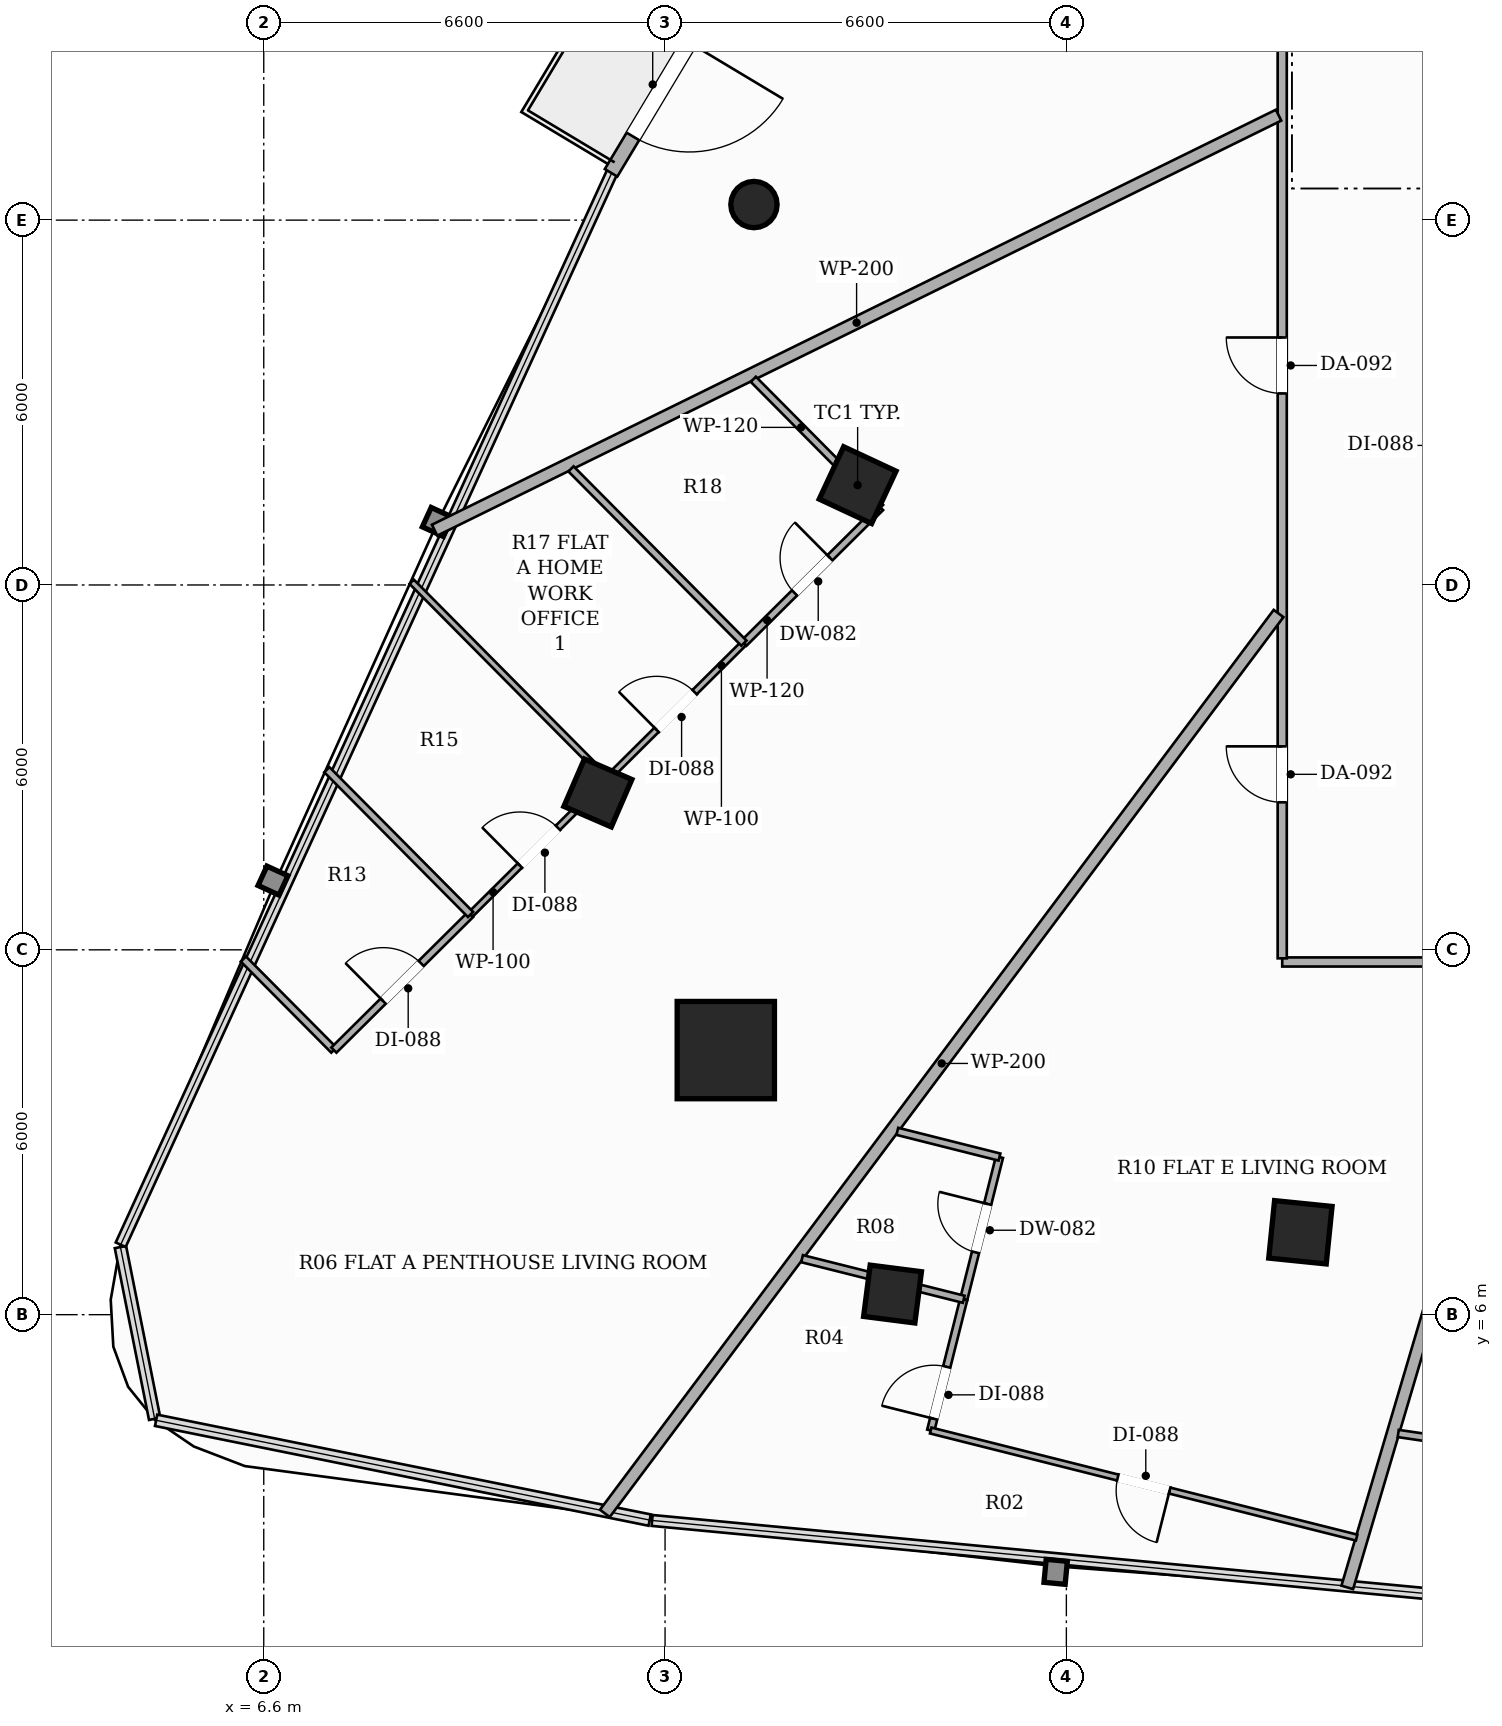
"""IFC4 building model, lengths in metres.
Left out: names, types, materials, properties, quantities, classifications, styles, units other than length and angle.
Written with IfcOpenShell. Run it as: python <this file> out.ifc"""

import sys

from ifc_helpers import new_model, si_unit, direction, frame, frame_2d, origin, origin_2d, place, context, subcontext, project, spatial, rectangle, hollow_rectangle, hollow_circle, extrude, element, fill, save


model = new_model("IFC4")
c1 = context("Model", 3, precision=1e-05, world=origin(), true_north=direction((0.0, 1.0)))
c2 = subcontext(c1, "Body", "Model", "MODEL_VIEW")
j1 = project(units=[si_unit("LENGTHUNIT", "METRE"), si_unit("PLANEANGLEUNIT", "RADIAN")], contexts=[c1])
p1 = place(None, origin())
s1 = spatial("IfcSite", under=j1, at=p1, CompositionType="ELEMENT")
p2 = place(p1, origin())
s2 = spatial("IfcBuilding", under=s1, at=p2, CompositionType="ELEMENT")
p3 = place(p2, frame((0.0, 0.0, 36.8)))
s3 = spatial("IfcBuildingStorey", under=s2, at=p3, CompositionType="ELEMENT", Elevation=36.8)
p4 = place(p3, frame((14.199, 10.351, 0.0), z_axis=(0.0, 0.0, 1.0), x_axis=(1.0, 0.0, 0.0)))
e1 = element("IfcColumn", 1, at=p4, inside=s3, PredefinedType="COLUMN", context=c2, shape_type="SweptSolid", body=[
    extrude(hollow_rectangle(XDim=1.6, YDim=1.6, WallThickness=0.05, at=origin_2d()), origin(), (0.0, 0.0, 1.0), 3.3),
])
for number, where, z_axis, x_axis in (
    (2, (16.367, 19.642, 0.0), (0.0, 0.0, 1.0), (0.423, 0.906, 0.0)),
    (3, (23.649, 7.355, 0.0), (0.0, 0.0, 1.0), (-0.995, 0.101, 0.0)),
):
    element("IfcColumn", number, at=place(p3, frame(where, z_axis=z_axis, x_axis=x_axis)), inside=s3, PredefinedType="COLUMN", context=c2, shape_type="SweptSolid", body=[
        extrude(hollow_rectangle(XDim=0.95, YDim=0.95, WallThickness=0.032, at=origin_2d()), origin(), (0.0, 0.0, 1.0), 3.3),
    ])
for number, where, z_axis, x_axis in (
    (4, (12.095, 14.58, 0.0), (0.0, 0.0, 1.0), (0.397, 0.918, 0.0)),
    (5, (16.941, 6.339, 0.0), (0.0, 0.0, 1.0), (-0.992, 0.127, 0.0)),
):
    element("IfcColumn", number, at=place(p3, frame(where, z_axis=z_axis, x_axis=x_axis)), inside=s3, PredefinedType="COLUMN", context=c2, shape_type="SweptSolid", body=[
        extrude(hollow_rectangle(XDim=0.85, YDim=0.85, WallThickness=0.028, at=origin_2d()), origin(), (0.0, 0.0, 1.0), 3.3),
    ])
p5 = place(p3, frame((14.662, 24.256, 0.0), z_axis=(0.0, 0.0, 1.0), x_axis=(1.0, 0.0, 0.0)))
e6 = element("IfcColumn", 6, at=p5, inside=s3, PredefinedType="COLUMN", context=c2, shape_type="SweptSolid", body=[
    extrude(hollow_circle(Radius=0.381, WallThickness=0.022, at=origin_2d()), origin(), (0.0, 0.0, 1.0), 3.3),
])
p6 = place(p3, frame((19.059, 36.028, 0.0), z_axis=(0.0, 0.0, 1.0), x_axis=(-0.514331531946, -0.857591438417, 0.0)))
e7 = element("IfcWall", 7, at=p6, inside=s3, PredefinedType="SOLIDWALL", context=c2, shape_type="SweptSolid", body=[
    extrude(rectangle(XDim=13.118, YDim=0.24, at=frame_2d((6.559, 0.0))), origin(), (0.0, 0.0, 1.0), 2.624),
])
p7 = place(p6, frame((10.62, 0.0, 0.0)))
e8 = element("IfcOpeningElement", 8, at=p7, cuts=e7, PredefinedType="OPENING", context=c2, shape_type="SweptSolid", body=[
    extrude(rectangle(XDim=1.8, YDim=2.2, at=frame_2d((0.9, 1.1))), frame((0.0, 0.13, 0.0), z_axis=(0.0, -1.0, 0.0), x_axis=(1.0, 0.0, 0.0)), (0.0, 0.0, 1.0), 0.26),
])
p8 = place(p3, frame((42.59, 11.8, 0.0), z_axis=(0.0, 0.0, 1.0), x_axis=(-1.0, 0.0, 0.0)))
e9 = element("IfcWall", 9, at=p8, inside=s3, PredefinedType="PARTITIONING", context=c2, shape_type="SweptSolid", body=[
    extrude(rectangle(XDim=19.24, YDim=0.15, at=frame_2d((9.62, 0.0))), origin(), (0.0, 0.0, 1.0), 2.669),
])
p9 = place(p8, frame((10.462, 0.0, 0.0)))
e10 = element("IfcOpeningElement", 10, at=p9, cuts=e9, PredefinedType="OPENING", context=c2, shape_type="SweptSolid", body=[
    extrude(rectangle(XDim=0.92, YDim=2.15, at=frame_2d((0.46, 1.075))), frame((0.0, 0.085, 0.0), z_axis=(0.0, -1.0, 0.0), x_axis=(1.0, 0.0, 0.0)), (0.0, 0.0, 1.0), 0.17),
])
p10 = place(p3, frame((23.35, 11.86, 0.0), z_axis=(0.0, 0.0, 1.0), x_axis=(0.0, 1.0, 0.0)))
e11 = element("IfcWall", 11, at=p10, inside=s3, PredefinedType="PARTITIONING", context=c2, shape_type="SweptSolid", body=[
    extrude(rectangle(XDim=25.04, YDim=0.15, at=frame_2d((12.52, 0.0))), origin(), (0.0, 0.0, 1.0), 2.413),
])
p11 = place(p10, frame((9.29, 0.0, 0.0)))
e12 = element("IfcOpeningElement", 12, at=p11, cuts=e11, PredefinedType="OPENING", context=c2, shape_type="SweptSolid", body=[
    extrude(rectangle(XDim=0.92, YDim=2.15, at=frame_2d((0.46, 1.075))), frame((0.0, 0.085, 0.0), z_axis=(0.0, -1.0, 0.0), x_axis=(1.0, 0.0, 0.0)), (0.0, 0.0, 1.0), 0.17),
])
p12 = place(p10, frame((18.865, 0.0, 0.0)))
e13 = element("IfcOpeningElement", 13, at=p12, cuts=e11, PredefinedType="OPENING", context=c2, shape_type="SweptSolid", body=[
    extrude(rectangle(XDim=0.88, YDim=2.1, at=frame_2d((0.44, 1.05))), frame((0.0, 0.085, 0.0), z_axis=(0.0, -1.0, 0.0), x_axis=(1.0, 0.0, 0.0)), (0.0, 0.0, 1.0), 0.17),
])
p13 = place(p10, frame((2.566, 0.0, 0.0)))
e14 = element("IfcOpeningElement", 14, at=p13, cuts=e11, PredefinedType="OPENING", context=c2, shape_type="SweptSolid", body=[
    extrude(rectangle(XDim=0.92, YDim=2.15, at=frame_2d((0.46, 1.075))), frame((0.0, 0.085, 0.0), z_axis=(0.0, -1.0, 0.0), x_axis=(1.0, 0.0, 0.0)), (0.0, 0.0, 1.0), 0.17),
])
p14 = place(p3, frame((9.41, 18.901, 0.0), z_axis=(0.0, 0.0, 1.0), x_axis=(0.89737804177, 0.44126256373, 0.0)))
e15 = element("IfcWall", 15, at=p14, inside=s3, PredefinedType="PARTITIONING", context=c2, shape_type="SweptSolid", body=[
    extrude(rectangle(XDim=15.468, YDim=0.2, at=frame_2d((7.734, 0.0))), origin(), (0.0, 0.0, 1.0), 2.413),
])
p15 = place(p3, frame((23.29, 17.531, 0.0), z_axis=(0.0, 0.0, 1.0), x_axis=(-0.599334217596, -0.800498904196, 0.0)))
e16 = element("IfcWall", 16, at=p15, inside=s3, PredefinedType="PARTITIONING", context=c2, shape_type="SweptSolid", body=[
    extrude(rectangle(XDim=18.487, YDim=0.2, at=frame_2d((9.244, 0.0))), origin(), (0.0, 0.0, 1.0), 2.413),
])
p16 = place(p3, frame((27.447, 11.74, 0.0), z_axis=(0.0, 0.0, 1.0), x_axis=(-0.283867721737, -0.958863450422, 0.0)))
e17 = element("IfcWall", 17, at=p16, inside=s3, PredefinedType="PARTITIONING", context=c2, shape_type="SweptSolid", body=[
    extrude(rectangle(XDim=10.664, YDim=0.2, at=frame_2d((5.332, 0.0))), origin(), (0.0, 0.0, 1.0), 2.413),
])
p17 = place(p3, frame((14.497, 17.043, 0.0), z_axis=(0.0, 0.0, 1.0), x_axis=(0.709608291954, 0.704596389425, 0.0)))
e18 = element("IfcWall", 18, at=p17, inside=s3, PredefinedType="PARTITIONING", context=c2, shape_type="SweptSolid", body=[
    extrude(rectangle(XDim=3.166, YDim=0.12, at=frame_2d((1.583, 0.0))), origin(), (0.0, 0.0, 1.0), 2.413),
])
p18 = place(p17, frame((1.173, 0.0, 0.0)))
e19 = element("IfcOpeningElement", 19, at=p18, cuts=e18, PredefinedType="OPENING", context=c2, shape_type="SweptSolid", body=[
    extrude(rectangle(XDim=0.82, YDim=2.1, at=frame_2d((0.41, 1.05))), frame((0.0, 0.07, 0.0), z_axis=(0.0, -1.0, 0.0), x_axis=(1.0, 0.0, 0.0)), (0.0, 0.0, 1.0), 0.14),
])
p19 = place(p3, frame((16.744, 19.274, 0.0), z_axis=(0.0, 0.0, 1.0), x_axis=(-0.704390177625, 0.709812987811, 0.0)))
e20 = element("IfcWall", 20, at=p19, inside=s3, PredefinedType="PARTITIONING", context=c2, shape_type="SweptSolid", body=[
    extrude(rectangle(XDim=2.971, YDim=0.12, at=frame_2d((1.486, 0.0))), origin(), (0.0, 0.0, 1.0), 2.413),
])
p20 = place(p3, frame((6.265, 11.849, 0.0), z_axis=(0.0, 0.0, 1.0), x_axis=(0.7047325022, -0.709473114602, 0.0)))
e21 = element("IfcWall", 21, at=p20, inside=s3, PredefinedType="PARTITIONING", context=c2, shape_type="SweptSolid", body=[
    extrude(rectangle(XDim=2.112, YDim=0.12, at=frame_2d((1.056, 0.0))), origin(), (0.0, 0.0, 1.0), 2.619),
])
p21 = place(p3, frame((7.753, 10.351, 0.0), z_axis=(0.0, 0.0, 1.0), x_axis=(0.709953794815, 0.704248258236, 0.0)))
e22 = element("IfcWall", 22, at=p21, inside=s3, PredefinedType="PARTITIONING", context=c2, shape_type="SweptSolid", body=[
    extrude(rectangle(XDim=3.167, YDim=0.12, at=frame_2d((1.583, 0.0))), origin(), (0.0, 0.0, 1.0), 2.619),
])
p22 = place(p21, frame((1.143, 0.0, 0.0)))
e23 = element("IfcOpeningElement", 23, at=p22, cuts=e22, PredefinedType="OPENING", context=c2, shape_type="SweptSolid", body=[
    extrude(rectangle(XDim=0.88, YDim=2.1, at=frame_2d((0.44, 1.05))), frame((0.0, 0.07, 0.0), z_axis=(0.0, -1.0, 0.0), x_axis=(1.0, 0.0, 0.0)), (0.0, 0.0, 1.0), 0.14),
])
p23 = place(p3, frame((10.001, 12.581, 0.0), z_axis=(0.0, 0.0, 1.0), x_axis=(0.70979961262, 0.70440365553, 0.0)))
e24 = element("IfcWall", 24, at=p23, inside=s3, PredefinedType="PARTITIONING", context=c2, shape_type="SweptSolid", body=[
    extrude(rectangle(XDim=3.167, YDim=0.1, at=frame_2d((1.583, 0.0))), origin(), (0.0, 0.0, 1.0), 2.413),
])
p24 = place(p23, frame((1.144, 0.0, 0.0)))
e25 = element("IfcOpeningElement", 25, at=p24, cuts=e24, PredefinedType="OPENING", context=c2, shape_type="SweptSolid", body=[
    extrude(rectangle(XDim=0.88, YDim=2.1, at=frame_2d((0.44, 1.05))), frame((0.0, 0.06, 0.0), z_axis=(0.0, -1.0, 0.0), x_axis=(1.0, 0.0, 0.0)), (0.0, 0.0, 1.0), 0.12),
])
p25 = place(p3, frame((12.249, 14.812, 0.0), z_axis=(0.0, 0.0, 1.0), x_axis=(0.70979961262, 0.70440365553, 0.0)))
e26 = element("IfcWall", 26, at=p25, inside=s3, PredefinedType="PARTITIONING", context=c2, shape_type="SweptSolid", body=[
    extrude(rectangle(XDim=3.167, YDim=0.1, at=frame_2d((1.583, 0.0))), origin(), (0.0, 0.0, 1.0), 2.413),
])
p26 = place(p25, frame((1.144, 0.0, 0.0)))
e27 = element("IfcOpeningElement", 27, at=p26, cuts=e26, PredefinedType="OPENING", context=c2, shape_type="SweptSolid", body=[
    extrude(rectangle(XDim=0.88, YDim=2.1, at=frame_2d((0.44, 1.05))), frame((0.0, 0.06, 0.0), z_axis=(0.0, -1.0, 0.0), x_axis=(1.0, 0.0, 0.0)), (0.0, 0.0, 1.0), 0.12),
])
p27 = place(p3, frame((14.497, 17.043, 0.0), z_axis=(0.0, 0.0, 1.0), x_axis=(-0.704380529073, 0.70982256252, 0.0)))
e28 = element("IfcWall", 28, at=p27, inside=s3, PredefinedType="PARTITIONING", context=c2, shape_type="SweptSolid", body=[
    extrude(rectangle(XDim=4.038, YDim=0.12, at=frame_2d((2.019, 0.0))), origin(), (0.0, 0.0, 1.0), 2.413),
])
p28 = place(p3, frame((7.638, 14.962, 0.0), z_axis=(0.0, 0.0, 1.0), x_axis=(0.704445292194, -0.709758290058, 0.0)))
e29 = element("IfcWall", 29, at=p28, inside=s3, PredefinedType="PARTITIONING", context=c2, shape_type="SweptSolid", body=[
    extrude(rectangle(XDim=3.354, YDim=0.12, at=frame_2d((1.677, 0.0))), origin(), (0.0, 0.0, 1.0), 3.06),
])
p29 = place(p3, frame((9.033, 18.053, 0.0), z_axis=(0.0, 0.0, 1.0), x_axis=(0.704374497722, -0.709828547579, 0.0)))
e30 = element("IfcWall", 30, at=p29, inside=s3, PredefinedType="PARTITIONING", context=c2, shape_type="SweptSolid", body=[
    extrude(rectangle(XDim=4.566, YDim=0.1, at=frame_2d((2.283, 0.0))), origin(), (0.0, 0.0, 1.0), 2.413),
])
p30 = place(p3, frame((18.112, 6.253, 0.0), z_axis=(0.0, 0.0, 1.0), x_axis=(0.2437501366, 0.96983806427, 0.0)))
e31 = element("IfcWall", 31, at=p30, inside=s3, PredefinedType="PARTITIONING", context=c2, shape_type="SweptSolid", body=[
    extrude(rectangle(XDim=2.412, YDim=0.12, at=frame_2d((1.206, 0.0))), origin(), (0.0, 0.0, 1.0), 2.413),
])
p31 = place(p30, frame((0.796, 0.0, 0.0)))
e32 = element("IfcOpeningElement", 32, at=p31, cuts=e31, PredefinedType="OPENING", context=c2, shape_type="SweptSolid", body=[
    extrude(rectangle(XDim=0.82, YDim=2.1, at=frame_2d((0.41, 1.05))), frame((0.0, 0.07, 0.0), z_axis=(0.0, -1.0, 0.0), x_axis=(1.0, 0.0, 0.0)), (0.0, 0.0, 1.0), 0.14),
])
p32 = place(p3, frame((18.7, 8.592, 0.0), z_axis=(0.0, 0.0, 1.0), x_axis=(-0.969751613308, 0.244093851802, 0.0)))
e33 = element("IfcWall", 33, at=p32, inside=s3, PredefinedType="PARTITIONING", context=c2, shape_type="SweptSolid", body=[
    extrude(rectangle(XDim=1.732, YDim=0.12, at=frame_2d((0.866, 0.0))), origin(), (0.0, 0.0, 1.0), 2.669),
])
p33 = place(p3, frame((17.569, 4.095, 0.0), z_axis=(0.0, 0.0, 1.0), x_axis=(0.244006821807, 0.969773515266, 0.0)))
e34 = element("IfcWall", 34, at=p33, inside=s3, PredefinedType="PARTITIONING", context=c2, shape_type="SweptSolid", body=[
    extrude(rectangle(XDim=2.225, YDim=0.12, at=frame_2d((1.113, 0.0))), origin(), (0.0, 0.0, 1.0), 2.413),
])
p34 = place(p33, frame((0.2, 0.0, 0.0)))
e35 = element("IfcOpeningElement", 35, at=p34, cuts=e34, PredefinedType="OPENING", context=c2, shape_type="SweptSolid", body=[
    extrude(rectangle(XDim=0.88, YDim=2.1, at=frame_2d((0.44, 1.05))), frame((0.0, 0.07, 0.0), z_axis=(0.0, -1.0, 0.0), x_axis=(1.0, 0.0, 0.0)), (0.0, 0.0, 1.0), 0.14),
])
p35 = place(p3, frame((24.574, 2.334, 0.0), z_axis=(0.0, 0.0, 1.0), x_axis=(-0.9698235368, 0.243807931512, 0.0)))
e36 = element("IfcWall", 36, at=p35, inside=s3, PredefinedType="PARTITIONING", context=c2, shape_type="SweptSolid", body=[
    extrude(rectangle(XDim=7.223, YDim=0.1, at=frame_2d((3.611, 0.0))), origin(), (0.0, 0.0, 1.0), 3.06),
])
p36 = place(p35, frame((3.171, 0.0, 0.0)))
e37 = element("IfcOpeningElement", 37, at=p36, cuts=e36, PredefinedType="OPENING", context=c2, shape_type="SweptSolid", body=[
    extrude(rectangle(XDim=0.88, YDim=2.1, at=frame_2d((0.44, 1.05))), frame((0.0, 0.06, 0.0), z_axis=(0.0, -1.0, 0.0), x_axis=(1.0, 0.0, 0.0)), (0.0, 0.0, 1.0), 0.12),
])
p37 = place(p3, frame((18.112, 6.253, 0.0), z_axis=(0.0, 0.0, 1.0), x_axis=(-0.969869517874, 0.243624954178, 0.0)))
e38 = element("IfcWall", 38, at=p37, inside=s3, PredefinedType="PARTITIONING", context=c2, shape_type="SweptSolid", body=[
    extrude(rectangle(XDim=2.742, YDim=0.12, at=frame_2d((1.371, 0.0))), origin(), (0.0, 0.0, 1.0), 2.413),
])
p38 = place(p3, frame((33.156, 2.889, 0.0), z_axis=(0.0, 0.0, 1.0), x_axis=(-0.98943978436, 0.144944517406, 0.0)))
e39 = element("IfcWall", 39, at=p38, inside=s3, PredefinedType="PARTITIONING", context=c2, shape_type="SweptSolid", body=[
    extrude(rectangle(XDim=7.982, YDim=0.12, at=frame_2d((3.991, 0.0))), origin(), (0.0, 0.0, 1.0), 2.413),
])
p39 = place(p38, frame((3.551, 0.0, 0.0)))
e40 = element("IfcOpeningElement", 40, at=p39, cuts=e39, PredefinedType="OPENING", context=c2, shape_type="SweptSolid", body=[
    extrude(rectangle(XDim=0.88, YDim=2.1, at=frame_2d((0.44, 1.05))), frame((0.0, 0.07, 0.0), z_axis=(0.0, -1.0, 0.0), x_axis=(1.0, 0.0, 0.0)), (0.0, 0.0, 1.0), 0.14),
])
p40 = place(p7, origin())
e41 = element("IfcDoor", 41, at=p40, inside=s3, OperationType="SINGLE_SWING_LEFT", PredefinedType="DOOR", context=c2, shape_type="SweptSolid", body=[
    extrude(rectangle(XDim=1.8, YDim=2.2, at=frame_2d((0.9, 1.1))), frame((0.0, 0.025, 0.0), z_axis=(0.0, -1.0, 0.0), x_axis=(1.0, 0.0, 0.0)), (0.0, 0.0, 1.0), 0.05),
])
fill(e8, e41)
p41 = place(p11, origin())
e42 = element("IfcDoor", 42, at=p41, inside=s3, OperationType="SINGLE_SWING_RIGHT", PredefinedType="DOOR", context=c2, shape_type="SweptSolid", body=[
    extrude(rectangle(XDim=0.92, YDim=2.15, at=frame_2d((0.46, 1.075))), frame((0.0, 0.025, 0.0), z_axis=(0.0, -1.0, 0.0), x_axis=(1.0, 0.0, 0.0)), (0.0, 0.0, 1.0), 0.05),
])
fill(e12, e42)
p42 = place(p18, origin())
e43 = element("IfcDoor", 43, at=p42, inside=s3, OperationType="SINGLE_SWING_RIGHT", PredefinedType="DOOR", context=c2, shape_type="SweptSolid", body=[
    extrude(rectangle(XDim=0.82, YDim=2.1, at=frame_2d((0.41, 1.05))), frame((0.0, 0.025, 0.0), z_axis=(0.0, -1.0, 0.0), x_axis=(1.0, 0.0, 0.0)), (0.0, 0.0, 1.0), 0.05),
])
fill(e19, e43)
p43 = place(p22, origin())
e44 = element("IfcDoor", 44, at=p43, inside=s3, OperationType="SINGLE_SWING_LEFT", PredefinedType="DOOR", context=c2, shape_type="SweptSolid", body=[
    extrude(rectangle(XDim=0.88, YDim=2.1, at=frame_2d((0.44, 1.05))), frame((0.0, 0.025, 0.0), z_axis=(0.0, -1.0, 0.0), x_axis=(1.0, 0.0, 0.0)), (0.0, 0.0, 1.0), 0.05),
])
fill(e23, e44)
p44 = place(p24, origin())
e45 = element("IfcDoor", 45, at=p44, inside=s3, OperationType="SINGLE_SWING_LEFT", PredefinedType="DOOR", context=c2, shape_type="SweptSolid", body=[
    extrude(rectangle(XDim=0.88, YDim=2.1, at=frame_2d((0.44, 1.05))), frame((0.0, 0.025, 0.0), z_axis=(0.0, -1.0, 0.0), x_axis=(1.0, 0.0, 0.0)), (0.0, 0.0, 1.0), 0.05),
])
fill(e25, e45)
p45 = place(p26, origin())
e46 = element("IfcDoor", 46, at=p45, inside=s3, OperationType="SINGLE_SWING_LEFT", PredefinedType="DOOR", context=c2, shape_type="SweptSolid", body=[
    extrude(rectangle(XDim=0.88, YDim=2.1, at=frame_2d((0.44, 1.05))), frame((0.0, 0.025, 0.0), z_axis=(0.0, -1.0, 0.0), x_axis=(1.0, 0.0, 0.0)), (0.0, 0.0, 1.0), 0.05),
])
fill(e27, e46)
p46 = place(p13, origin())
e47 = element("IfcDoor", 47, at=p46, inside=s3, OperationType="SINGLE_SWING_RIGHT", PredefinedType="DOOR", context=c2, shape_type="SweptSolid", body=[
    extrude(rectangle(XDim=0.92, YDim=2.15, at=frame_2d((0.46, 1.075))), frame((0.0, 0.025, 0.0), z_axis=(0.0, -1.0, 0.0), x_axis=(1.0, 0.0, 0.0)), (0.0, 0.0, 1.0), 0.05),
])
fill(e14, e47)
p47 = place(p31, origin())
e48 = element("IfcDoor", 48, at=p47, inside=s3, OperationType="SINGLE_SWING_RIGHT", PredefinedType="DOOR", context=c2, shape_type="SweptSolid", body=[
    extrude(rectangle(XDim=0.82, YDim=2.1, at=frame_2d((0.41, 1.05))), frame((0.0, 0.025, 0.0), z_axis=(0.0, -1.0, 0.0), x_axis=(1.0, 0.0, 0.0)), (0.0, 0.0, 1.0), 0.05),
])
fill(e32, e48)
p48 = place(p34, origin())
e49 = element("IfcDoor", 49, at=p48, inside=s3, OperationType="SINGLE_SWING_LEFT", PredefinedType="DOOR", context=c2, shape_type="SweptSolid", body=[
    extrude(rectangle(XDim=0.88, YDim=2.1, at=frame_2d((0.44, 1.05))), frame((0.0, 0.025, 0.0), z_axis=(0.0, -1.0, 0.0), x_axis=(1.0, 0.0, 0.0)), (0.0, 0.0, 1.0), 0.05),
])
fill(e35, e49)
p49 = place(p36, origin())
e50 = element("IfcDoor", 50, at=p49, inside=s3, OperationType="SINGLE_SWING_LEFT", PredefinedType="DOOR", context=c2, shape_type="SweptSolid", body=[
    extrude(rectangle(XDim=0.88, YDim=2.1, at=frame_2d((0.44, 1.05))), frame((0.0, 0.025, 0.0), z_axis=(0.0, -1.0, 0.0), x_axis=(1.0, 0.0, 0.0)), (0.0, 0.0, 1.0), 0.05),
])
fill(e37, e50)
save(model, sys.argv[1])
